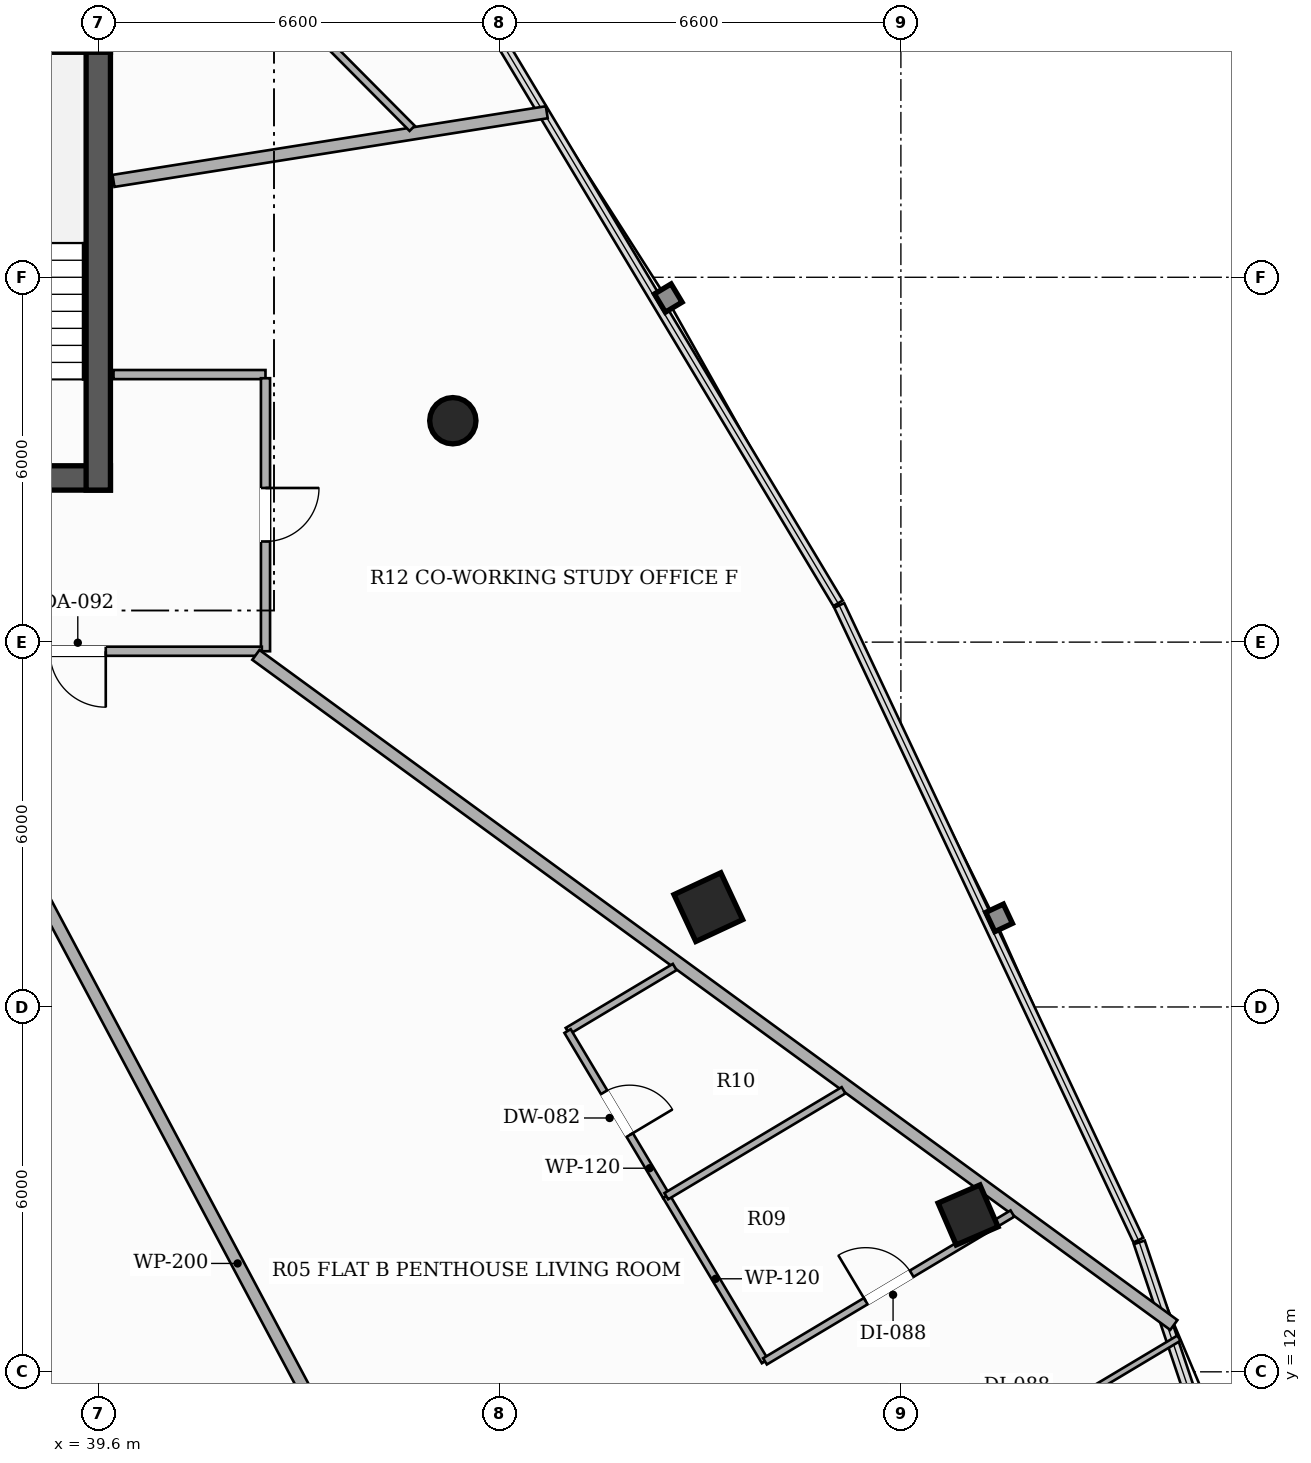
"""IFC4 building model, lengths in metres.
Left out: names, types, materials, properties, quantities, classifications, styles, units other than length and angle.
Written with IfcOpenShell. Run it as: python <this file> out.ifc"""

import sys

from ifc_helpers import new_model, si_unit, direction, frame, frame_2d, origin, origin_2d, place, context, subcontext, project, spatial, rectangle, hollow_rectangle, hollow_circle, extrude, element, fill, save


model = new_model("IFC4")
c1 = context("Model", 3, precision=1e-05, world=origin(), true_north=direction((0.0, 1.0)))
c2 = subcontext(c1, "Body", "Model", "MODEL_VIEW")
j1 = project(units=[si_unit("LENGTHUNIT", "METRE"), si_unit("PLANEANGLEUNIT", "RADIAN")], contexts=[c1])
p1 = place(None, origin())
s1 = spatial("IfcSite", under=j1, at=p1, CompositionType="ELEMENT")
p2 = place(p1, origin())
s2 = spatial("IfcBuilding", under=s1, at=p2, CompositionType="ELEMENT")
p3 = place(p2, frame((0.0, 0.0, 116.6)))
s3 = spatial("IfcBuildingStorey", under=s2, at=p3, CompositionType="ELEMENT", Elevation=116.6)
p4 = place(p3, frame((26.2, 26.7, 0.0), z_axis=(0.0, 0.0, 1.0), x_axis=(1.0, 0.0, 0.0)))
e1 = element("IfcWall", 1, at=p4, inside=s3, PredefinedType="SHEAR", context=c2, shape_type="SweptSolid", body=[
    extrude(rectangle(XDim=13.6, YDim=0.4, at=frame_2d((6.8, 0.0))), origin(), (0.0, 0.0, 1.0), 3.3),
])
p5 = place(p4, frame((4.35, 0.0, 0.0)))
e2 = element("IfcOpeningElement", 2, at=p5, cuts=e1, PredefinedType="OPENING", context=c2, shape_type="SweptSolid", body=[
    extrude(rectangle(XDim=1.05, YDim=2.15, at=frame_2d((0.525, 1.075))), frame((0.0, 0.21, 0.0), z_axis=(0.0, -1.0, 0.0), x_axis=(1.0, 0.0, 0.0)), (0.0, 0.0, 1.0), 0.42),
])
p6 = place(p4, frame((8.3, 0.0, 0.0)))
e3 = element("IfcOpeningElement", 3, at=p6, cuts=e1, PredefinedType="OPENING", context=c2, shape_type="SweptSolid", body=[
    extrude(rectangle(XDim=1.05, YDim=2.15, at=frame_2d((0.525, 1.075))), frame((0.0, 0.21, 0.0), z_axis=(0.0, -1.0, 0.0), x_axis=(1.0, 0.0, 0.0)), (0.0, 0.0, 1.0), 0.42),
])
p7 = place(p3, frame((39.6, 26.5, 0.0), z_axis=(0.0, 0.0, 1.0), x_axis=(0.0, 1.0, 0.0)))
e4 = element("IfcWall", 4, at=p7, inside=s3, PredefinedType="SHEAR", context=c2, shape_type="SweptSolid", body=[
    extrude(rectangle(XDim=7.6, YDim=0.4, at=frame_2d((3.8, 0.0))), origin(), (0.0, 0.0, 1.0), 3.3),
])
p8 = place(p3, frame((36.12, 33.9, 0.0), z_axis=(0.0, 0.0, 1.0), x_axis=(1.0, 0.0, 0.0)))
e5 = element("IfcWall", 5, at=p8, inside=s3, PredefinedType="SHEAR", context=c2, shape_type="SweptSolid", body=[
    extrude(rectangle(XDim=3.68, YDim=0.4, at=frame_2d((1.84, 0.0))), origin(), (0.0, 0.0, 1.0), 3.3),
])
p9 = place(p3, frame((49.633, 19.642, 0.0), z_axis=(0.0, 0.0, 1.0), x_axis=(-0.422618261741, 0.906307787037, 0.0)))
e6 = element("IfcColumn", 6, at=p9, inside=s3, PredefinedType="COLUMN", context=c2, shape_type="SweptSolid", body=[
    extrude(hollow_rectangle(XDim=0.85, YDim=0.85, WallThickness=0.028, at=origin_2d()), origin(), (0.0, 0.0, 1.0), 3.3),
])
p10 = place(p3, frame((45.431, 27.641, 0.0), z_axis=(0.0, 0.0, 1.0), x_axis=(1.0, 0.0, 0.0)))
e7 = element("IfcColumn", 7, at=p10, inside=s3, PredefinedType="COLUMN", context=c2, shape_type="SweptSolid", body=[
    extrude(hollow_circle(Radius=0.381, WallThickness=0.022, at=origin_2d()), origin(), (0.0, 0.0, 1.0), 3.3),
])
p11 = place(p3, frame((53.905, 14.58, 0.0), z_axis=(0.0, 0.0, 1.0), x_axis=(-0.397147890635, 0.917754625684, 0.0)))
e8 = element("IfcColumn", 8, at=p11, inside=s3, PredefinedType="COLUMN", context=c2, shape_type="SweptSolid", body=[
    extrude(hollow_rectangle(XDim=0.75, YDim=0.75, WallThickness=0.025, at=origin_2d()), origin(), (0.0, 0.0, 1.0), 3.3),
])
p12 = place(p3, frame((39.85, 28.4, 0.0), z_axis=(0.0, 0.0, 1.0), x_axis=(1.0, 0.0, 0.0)))
e9 = element("IfcWall", 9, at=p12, inside=s3, PredefinedType="PARTITIONING", context=c2, shape_type="SweptSolid", body=[
    extrude(rectangle(XDim=2.5, YDim=0.15, at=frame_2d((1.25, 0.0))), origin(), (0.0, 0.0, 1.0), 2.721),
])
p13 = place(p3, frame((42.35, 28.34, 0.0), z_axis=(0.0, 0.0, 1.0), x_axis=(0.0, -1.0, 0.0)))
e10 = element("IfcWall", 10, at=p13, inside=s3, PredefinedType="PARTITIONING", context=c2, shape_type="SweptSolid", body=[
    extrude(rectangle(XDim=4.49, YDim=0.15, at=frame_2d((2.245, 0.0))), origin(), (0.0, 0.0, 1.0), 2.721),
])
p14 = place(p13, frame((1.805, 0.0, 0.0)))
e11 = element("IfcOpeningElement", 11, at=p14, cuts=e10, PredefinedType="OPENING", context=c2, shape_type="SweptSolid", body=[
    extrude(rectangle(XDim=0.88, YDim=2.1, at=frame_2d((0.44, 1.05))), frame((0.0, 0.085, 0.0), z_axis=(0.0, -1.0, 0.0), x_axis=(1.0, 0.0, 0.0)), (0.0, 0.0, 1.0), 0.17),
])
p15 = place(p3, frame((42.29, 23.85, 0.0), z_axis=(0.0, 0.0, 1.0), x_axis=(-1.0, 0.0, 0.0)))
e12 = element("IfcWall", 12, at=p15, inside=s3, PredefinedType="PARTITIONING", context=c2, shape_type="SweptSolid", body=[
    extrude(rectangle(XDim=8.088, YDim=0.15, at=frame_2d((4.044, 0.0))), origin(), (0.0, 0.0, 1.0), 2.492),
])
p16 = place(p15, frame((2.567, 0.0, 0.0)))
e13 = element("IfcOpeningElement", 13, at=p16, cuts=e12, PredefinedType="OPENING", context=c2, shape_type="SweptSolid", body=[
    extrude(rectangle(XDim=0.92, YDim=2.15, at=frame_2d((0.46, 1.075))), frame((0.0, 0.085, 0.0), z_axis=(0.0, -1.0, 0.0), x_axis=(1.0, 0.0, 0.0)), (0.0, 0.0, 1.0), 0.17),
])
p17 = place(p15, frame((6.296, 0.0, 0.0)))
e14 = element("IfcOpeningElement", 14, at=p17, cuts=e12, PredefinedType="OPENING", context=c2, shape_type="SweptSolid", body=[
    extrude(rectangle(XDim=0.92, YDim=2.15, at=frame_2d((0.46, 1.075))), frame((0.0, 0.085, 0.0), z_axis=(0.0, -1.0, 0.0), x_axis=(1.0, 0.0, 0.0)), (0.0, 0.0, 1.0), 0.17),
])
p18 = place(p3, frame((47.214, 3.775, 0.0), z_axis=(0.0, 0.0, 1.0), x_axis=(-0.469567249912, 0.88289670846, 0.0)))
e15 = element("IfcWall", 15, at=p18, inside=s3, PredefinedType="PARTITIONING", context=c2, shape_type="SweptSolid", body=[
    extrude(rectangle(XDim=22.67, YDim=0.2, at=frame_2d((11.335, 0.0))), origin(), (0.0, 0.0, 1.0), 2.413),
])
p19 = place(p3, frame((42.192, 23.79, 0.0), z_axis=(0.0, 0.0, 1.0), x_axis=(0.807710254014, -0.589579634621, 0.0)))
e16 = element("IfcWall", 16, at=p19, inside=s3, PredefinedType="PARTITIONING", context=c2, shape_type="SweptSolid", body=[
    extrude(rectangle(XDim=18.691, YDim=0.2, at=frame_2d((9.346, 0.0))), origin(), (0.0, 0.0, 1.0), 2.413),
])
p20 = place(p3, frame((46.976, 32.714, 0.0), z_axis=(0.0, 0.0, 1.0), x_axis=(-0.987677489662, -0.156502959767, 0.0)))
e17 = element("IfcWall", 17, at=p20, inside=s3, PredefinedType="PARTITIONING", context=c2, shape_type="SweptSolid", body=[
    extrude(rectangle(XDim=7.215, YDim=0.2, at=frame_2d((3.607, 0.0))), origin(), (0.0, 0.0, 1.0), 2.413),
])
p21 = place(p3, frame((49.08, 18.657, 0.0), z_axis=(0.0, 0.0, 1.0), x_axis=(-0.858394155401, -0.51299071529, 0.0)))
e18 = element("IfcWall", 18, at=p21, inside=s3, PredefinedType="PARTITIONING", context=c2, shape_type="SweptSolid", body=[
    extrude(rectangle(XDim=2.053, YDim=0.12, at=frame_2d((1.026, 0.0))), origin(), (0.0, 0.0, 1.0), 2.721),
])
p22 = place(p3, frame((47.318, 17.604, 0.0), z_axis=(0.0, 0.0, 1.0), x_axis=(0.51313361254, -0.858308741469, 0.0)))
e19 = element("IfcWall", 19, at=p22, inside=s3, PredefinedType="PARTITIONING", context=c2, shape_type="SweptSolid", body=[
    extrude(rectangle(XDim=3.165, YDim=0.12, at=frame_2d((1.582, 0.0))), origin(), (0.0, 0.0, 1.0), 2.492),
])
p23 = place(p22, frame((1.172, 0.0, 0.0)))
e20 = element("IfcOpeningElement", 20, at=p23, cuts=e19, PredefinedType="OPENING", context=c2, shape_type="SweptSolid", body=[
    extrude(rectangle(XDim=0.82, YDim=2.1, at=frame_2d((0.41, 1.05))), frame((0.0, 0.07, 0.0), z_axis=(0.0, -1.0, 0.0), x_axis=(1.0, 0.0, 0.0)), (0.0, 0.0, 1.0), 0.14),
])
p24 = place(p3, frame((48.942, 14.888, 0.0), z_axis=(0.0, 0.0, 1.0), x_axis=(0.512997049548, -0.858390369911, 0.0)))
e21 = element("IfcWall", 21, at=p24, inside=s3, PredefinedType="PARTITIONING", context=c2, shape_type="SweptSolid", body=[
    extrude(rectangle(XDim=3.164, YDim=0.12, at=frame_2d((1.582, 0.0))), origin(), (0.0, 0.0, 1.0), 2.492),
])
p25 = place(p3, frame((50.565, 12.172, 0.0), z_axis=(0.0, 0.0, 1.0), x_axis=(0.858473034369, 0.512858703018, 0.0)))
e22 = element("IfcWall", 22, at=p25, inside=s3, PredefinedType="PARTITIONING", context=c2, shape_type="SweptSolid", body=[
    extrude(rectangle(XDim=4.74, YDim=0.12, at=frame_2d((2.37, 0.0))), origin(), (0.0, 0.0, 1.0), 2.413),
])
p26 = place(p25, frame((1.93, 0.0, 0.0)))
e23 = element("IfcOpeningElement", 23, at=p26, cuts=e22, PredefinedType="OPENING", context=c2, shape_type="SweptSolid", body=[
    extrude(rectangle(XDim=0.88, YDim=2.1, at=frame_2d((0.44, 1.05))), frame((0.0, 0.07, 0.0), z_axis=(0.0, -1.0, 0.0), x_axis=(1.0, 0.0, 0.0)), (0.0, 0.0, 1.0), 0.14),
])
p27 = place(p3, frame((57.373, 12.554, 0.0), z_axis=(0.0, 0.0, 1.0), x_axis=(-0.858379637305, -0.513015007831, 0.0)))
e24 = element("IfcWall", 24, at=p27, inside=s3, PredefinedType="PARTITIONING", context=c2, shape_type="SweptSolid", body=[
    extrude(rectangle(XDim=6.041, YDim=0.1, at=frame_2d((3.02, 0.0))), origin(), (0.0, 0.0, 1.0), 2.619),
])
p28 = place(p27, frame((2.58, 0.0, 0.0)))
e25 = element("IfcOpeningElement", 25, at=p28, cuts=e24, PredefinedType="OPENING", context=c2, shape_type="SweptSolid", body=[
    extrude(rectangle(XDim=0.88, YDim=2.1, at=frame_2d((0.44, 1.05))), frame((0.0, 0.06, 0.0), z_axis=(0.0, -1.0, 0.0), x_axis=(1.0, 0.0, 0.0)), (0.0, 0.0, 1.0), 0.12),
])
p29 = place(p3, frame((51.857, 16.63, 0.0), z_axis=(0.0, 0.0, 1.0), x_axis=(-0.858411372428, -0.512961904713, 0.0)))
e26 = element("IfcWall", 26, at=p29, inside=s3, PredefinedType="PARTITIONING", context=c2, shape_type="SweptSolid", body=[
    extrude(rectangle(XDim=3.396, YDim=0.12, at=frame_2d((1.698, 0.0))), origin(), (0.0, 0.0, 1.0), 2.413),
])
p30 = place(p3, frame((39.203, 38.043, 0.0), z_axis=(0.0, 0.0, 1.0), x_axis=(0.704889894519, -0.709316739267, 0.0)))
e27 = element("IfcWall", 27, at=p30, inside=s3, PredefinedType="PARTITIONING", context=c2, shape_type="SweptSolid", body=[
    extrude(rectangle(XDim=7.886, YDim=0.12, at=frame_2d((3.943, 0.0))), origin(), (0.0, 0.0, 1.0), 2.413),
])
p31 = place(p30, frame((3.78, 0.0, 0.0)))
e28 = element("IfcOpeningElement", 28, at=p31, cuts=e27, PredefinedType="OPENING", context=c2, shape_type="SweptSolid", body=[
    extrude(rectangle(XDim=0.82, YDim=2.1, at=frame_2d((0.41, 1.05))), frame((0.0, 0.07, 0.0), z_axis=(0.0, -1.0, 0.0), x_axis=(1.0, 0.0, 0.0)), (0.0, 0.0, 1.0), 0.14),
])
p32 = place(p16, origin())
e29 = element("IfcDoor", 29, at=p32, inside=s3, OperationType="SINGLE_SWING_LEFT", PredefinedType="DOOR", context=c2, shape_type="SweptSolid", body=[
    extrude(rectangle(XDim=0.92, YDim=2.15, at=frame_2d((0.46, 1.075))), frame((0.0, 0.025, 0.0), z_axis=(0.0, -1.0, 0.0), x_axis=(1.0, 0.0, 0.0)), (0.0, 0.0, 1.0), 0.05),
])
fill(e13, e29)
p33 = place(p23, origin())
e30 = element("IfcDoor", 30, at=p33, inside=s3, OperationType="SINGLE_SWING_RIGHT", PredefinedType="DOOR", context=c2, shape_type="SweptSolid", body=[
    extrude(rectangle(XDim=0.82, YDim=2.1, at=frame_2d((0.41, 1.05))), frame((0.0, 0.025, 0.0), z_axis=(0.0, -1.0, 0.0), x_axis=(1.0, 0.0, 0.0)), (0.0, 0.0, 1.0), 0.05),
])
fill(e20, e30)
p34 = place(p26, origin())
e31 = element("IfcDoor", 31, at=p34, inside=s3, OperationType="SINGLE_SWING_LEFT", PredefinedType="DOOR", context=c2, shape_type="SweptSolid", body=[
    extrude(rectangle(XDim=0.88, YDim=2.1, at=frame_2d((0.44, 1.05))), frame((0.0, 0.025, 0.0), z_axis=(0.0, -1.0, 0.0), x_axis=(1.0, 0.0, 0.0)), (0.0, 0.0, 1.0), 0.05),
])
fill(e23, e31)
p35 = place(p14, origin())
e32 = element("IfcDoor", 32, at=p35, inside=s3, OperationType="SINGLE_SWING_LEFT", PredefinedType="DOOR", context=c2, shape_type="SweptSolid", body=[
    extrude(rectangle(XDim=0.88, YDim=2.1, at=frame_2d((0.44, 1.05))), frame((0.0, 0.025, 0.0), z_axis=(0.0, -1.0, 0.0), x_axis=(1.0, 0.0, 0.0)), (0.0, 0.0, 1.0), 0.05),
])
fill(e11, e32)
save(model, sys.argv[1])
